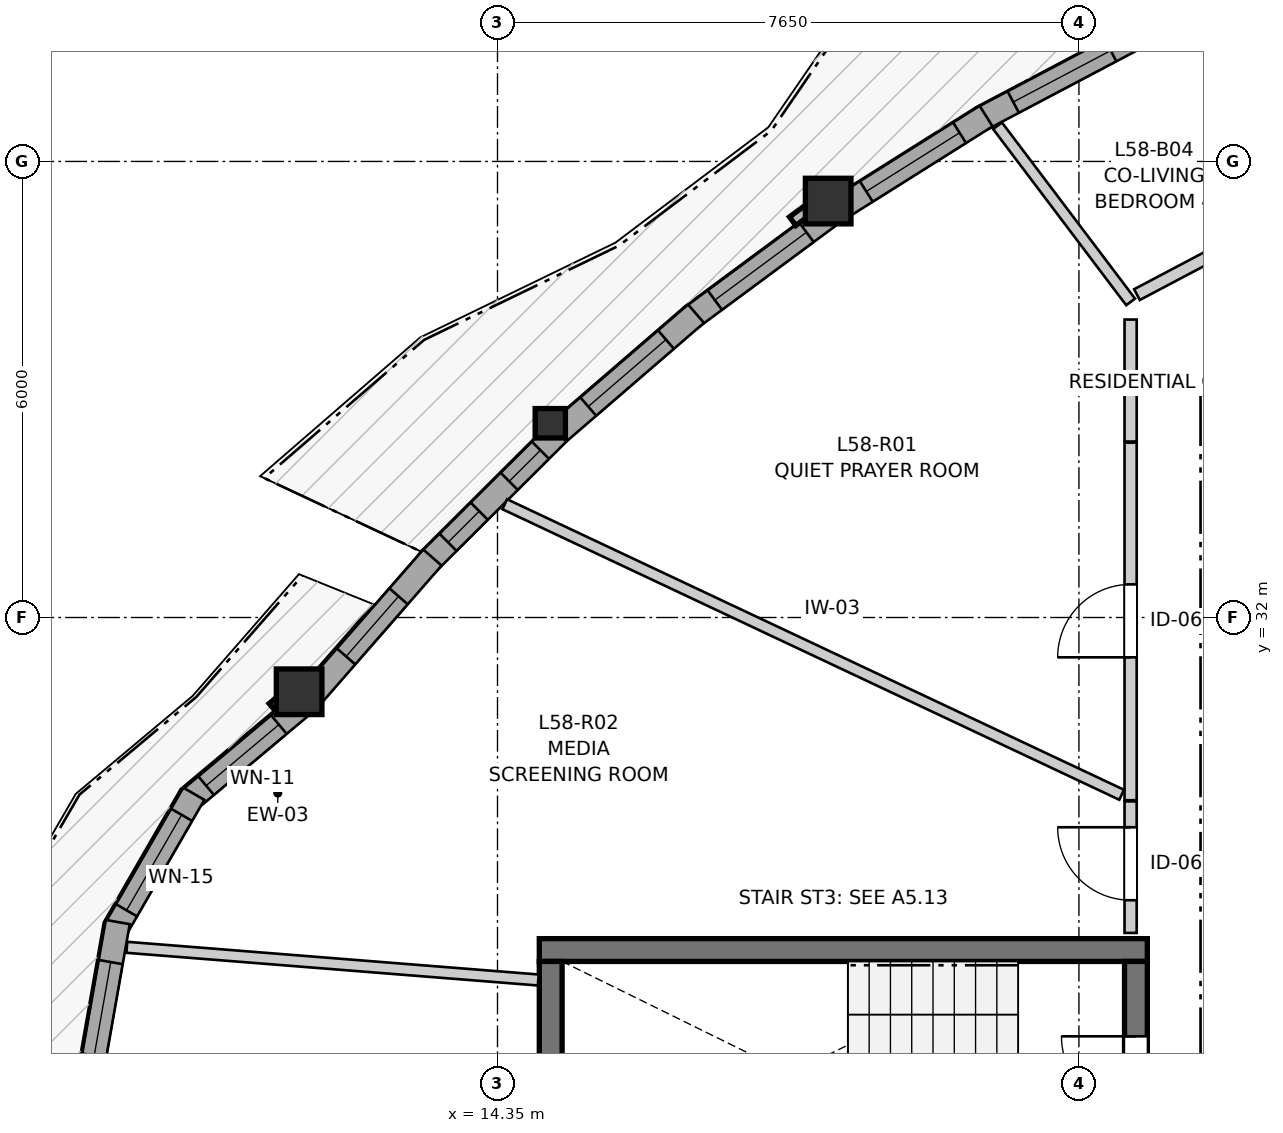
"""IFC4 building model, lengths in metres.
Left out: names, types, materials, properties, quantities, classifications, styles, units other than length and angle.
Written with IfcOpenShell. Run it as: python <this file> out.ifc"""

import sys

from ifc_helpers import new_model, si_unit, direction, frame, frame_2d, origin, origin_2d, place, context, subcontext, project, spatial, rectangle, i_section, extrude, source, transform, mapped, element, fill, save


model = new_model("IFC4")
c1 = context("Model", 3, precision=1e-05, world=origin(), true_north=direction((0.0, 1.0)))
c2 = subcontext(c1, "Body", "Model", "MODEL_VIEW")
j1 = project(units=[si_unit("LENGTHUNIT", "METRE"), si_unit("PLANEANGLEUNIT", "RADIAN")], contexts=[c1])
p1 = place(None, origin())
s1 = spatial("IfcSite", under=j1, at=p1, CompositionType="ELEMENT")
p2 = place(p1, origin())
s2 = spatial("IfcBuilding", under=s1, at=p2, CompositionType="ELEMENT")
p3 = place(p2, frame((0.0, 0.0, 195.6)))
s3 = spatial("IfcBuildingStorey", under=s2, at=p3, CompositionType="ELEMENT", Elevation=195.6)
p4 = place(p3, frame((22.9, 27.625, 0.0), z_axis=(0.0, 0.0, 1.0), x_axis=(-1.0, 0.0, 0.0)))
e1 = element("IfcWall", 1, at=p4, inside=s3, PredefinedType="SHEAR", context=c2, shape_type="SweptSolid", body=[
    extrude(rectangle(XDim=8.0, YDim=0.3, at=frame_2d((4.0, 0.0))), origin(), (0.0, 0.0, 1.0), 2.96),
])
p5 = place(p3, frame((15.05, 27.475, 0.0), z_axis=(0.0, 0.0, 1.0), x_axis=(0.0, -1.0, 0.0)))
e2 = element("IfcWall", 2, at=p5, inside=s3, PredefinedType="SHEAR", context=c2, shape_type="SweptSolid", body=[
    extrude(rectangle(XDim=2.95, YDim=0.3, at=frame_2d((1.475, 0.0))), origin(), (0.0, 0.0, 1.0), 2.96),
])
p6 = place(p3, frame((22.75, 24.525, 0.0), z_axis=(0.0, 0.0, 1.0), x_axis=(0.0, 1.0, 0.0)))
e3 = element("IfcWall", 3, at=p6, inside=s3, PredefinedType="SHEAR", context=c2, shape_type="SweptSolid", body=[
    extrude(rectangle(XDim=2.95, YDim=0.3, at=frame_2d((1.475, 0.0))), origin(), (0.0, 0.0, 1.0), 2.96),
])
p7 = place(p6, frame((0.985, 0.0, 0.0)))
e4 = element("IfcOpeningElement", 4, at=p7, cuts=e3, PredefinedType="OPENING", context=c2, shape_type="SweptSolid", body=[
    extrude(rectangle(XDim=0.98, YDim=2.15, at=frame_2d((0.49, 1.075))), frame((0.0, 0.16, 0.0), z_axis=(0.0, -1.0, 0.0), x_axis=(1.0, 0.0, 0.0)), (0.0, 0.0, 1.0), 0.32),
])
m1 = source(origin(), c2, "Body", "SweptSolid", [
    extrude(rectangle(XDim=0.6, YDim=0.6, at=origin_2d()), origin(), (0.0, 0.0, 1.0), 2.96),
])
for number, where, z_axis, x_axis in (
    (5, (11.74, 31.023, 0.0), (0.0, 0.0, 1.0), (1.0, 0.0, 0.0)),
    (6, (18.701, 37.479, 0.0), (0.0, 0.0, 1.0), (1.0, 0.0, 0.0)),
):
    element("IfcColumn", number, at=place(p3, frame(where, z_axis=z_axis, x_axis=x_axis)), inside=s3, PredefinedType="COLUMN", context=c2, shape_type="MappedRepresentation", body=[
        mapped(m1, transform((0.0, 0.0, 0.0), x_axis=(1.0, 0.0, 0.0), y_axis=(0.0, 1.0, 0.0), z_axis=(0.0, 0.0, 1.0), scale=1.0)),
    ])
m2 = source(origin(), c2, "Body", "SweptSolid", [
    extrude(i_section(OverallWidth=0.398, OverallDepth=0.387, WebThickness=0.019, FlangeThickness=0.03, FilletRadius=0.015, at=origin_2d()), origin(), (0.0, 0.0, 1.0), 2.96),
])
p8 = place(p3, frame((15.044, 34.555, 0.0), z_axis=(0.0, 0.0, 1.0), x_axis=(1.0, 0.0, 0.0)))
e7 = element("IfcColumn", 7, at=p8, inside=s3, PredefinedType="PILASTER", context=c2, shape_type="MappedRepresentation", body=[
    mapped(m2, transform((0.0, 0.0, 0.0), x_axis=(1.0, 0.0, 0.0), y_axis=(0.0, 1.0, 0.0), z_axis=(0.0, 0.0, 1.0), scale=1.0)),
])
p9 = place(p3, frame((11.774, 30.843, 0.0), z_axis=(0.0, 0.0, 1.0), x_axis=(-0.766116451135, -0.642701784112, 0.0)))
e8 = element("IfcWall", 8, at=p9, inside=s3, PredefinedType="SOLIDWALL", context=c2, shape_type="SweptSolid", body=[
    extrude(rectangle(XDim=1.962, YDim=0.32, at=frame_2d((0.981, 0.0))), origin(), (0.0, 0.0, 1.0), 2.58),
])
p10 = place(p9, frame((0.391, 0.0, 0.82)))
e9 = element("IfcOpeningElement", 9, at=p10, cuts=e8, PredefinedType="OPENING", context=c2, shape_type="SweptSolid", body=[
    extrude(rectangle(XDim=1.25, YDim=1.35, at=frame_2d((0.625, 0.675))), frame((0.0, 0.17, 0.0), z_axis=(0.0, -1.0, 0.0), x_axis=(1.0, 0.0, 0.0)), (0.0, 0.0, 1.0), 0.34),
])
p11 = place(p3, frame((10.354, 29.681, 0.0), z_axis=(0.0, 0.0, 1.0), x_axis=(-0.499995423472, -0.866028046028, 0.0)))
e10 = element("IfcWall", 10, at=p11, inside=s3, PredefinedType="SOLIDWALL", context=c2, shape_type="SweptSolid", body=[
    extrude(rectangle(XDim=2.09, YDim=0.32, at=frame_2d((1.045, 0.0))), origin(), (0.0, 0.0, 1.0), 2.58),
])
p12 = place(p11, frame((0.32, 0.0, 0.82)))
e11 = element("IfcOpeningElement", 11, at=p12, cuts=e10, PredefinedType="OPENING", context=c2, shape_type="SweptSolid", body=[
    extrude(rectangle(XDim=1.45, YDim=1.25, at=frame_2d((0.725, 0.625))), frame((0.0, 0.17, 0.0), z_axis=(0.0, -1.0, 0.0), x_axis=(1.0, 0.0, 0.0)), (0.0, 0.0, 1.0), 0.34),
])
p13 = place(p3, frame((9.354, 27.993, 0.0), z_axis=(0.0, 0.0, 1.0), x_axis=(-0.173672066494, -0.984803540469, 0.0)))
e12 = element("IfcWall", 12, at=p13, inside=s3, PredefinedType="SOLIDWALL", context=c2, shape_type="SweptSolid", body=[
    extrude(rectangle(XDim=2.09, YDim=0.32, at=frame_2d((1.045, 0.0))), origin(), (0.0, 0.0, 1.0), 2.58),
])
p14 = place(p13, frame((0.535, 0.0, 0.82)))
e13 = element("IfcOpeningElement", 13, at=p14, cuts=e12, PredefinedType="OPENING", context=c2, shape_type="SweptSolid", body=[
    extrude(rectangle(XDim=1.25, YDim=1.35, at=frame_2d((0.625, 0.675))), frame((0.0, 0.17, 0.0), z_axis=(0.0, -1.0, 0.0), x_axis=(1.0, 0.0, 0.0)), (0.0, 0.0, 1.0), 0.34),
])
p15 = place(p3, frame((22.766, 39.642, 0.0), z_axis=(0.0, 0.0, 1.0), x_axis=(-0.884377555637, -0.466772256122, 0.0)))
e14 = element("IfcWall", 14, at=p15, inside=s3, PredefinedType="SOLIDWALL", context=c2, shape_type="SweptSolid", body=[
    extrude(rectangle(XDim=2.334, YDim=0.32, at=frame_2d((1.167, 0.0))), origin(), (0.0, 0.0, 1.0), 2.58),
])
p16 = place(p15, frame((0.393, 0.0, 0.82)))
e15 = element("IfcOpeningElement", 15, at=p16, cuts=e14, PredefinedType="OPENING", context=c2, shape_type="SweptSolid", body=[
    extrude(rectangle(XDim=1.45, YDim=1.25, at=frame_2d((0.725, 0.625))), frame((0.0, 0.17, 0.0), z_axis=(0.0, -1.0, 0.0), x_axis=(1.0, 0.0, 0.0)), (0.0, 0.0, 1.0), 0.34),
])
p17 = place(p3, frame((20.778, 38.597, 0.0), z_axis=(0.0, 0.0, 1.0), x_axis=(-0.84639489148, -0.532555807101, 0.0)))
e16 = element("IfcWall", 16, at=p17, inside=s3, PredefinedType="SOLIDWALL", context=c2, shape_type="SweptSolid", body=[
    extrude(rectangle(XDim=2.264, YDim=0.32, at=frame_2d((1.132, 0.0))), origin(), (0.0, 0.0, 1.0), 2.58),
])
p18 = place(p17, frame((0.412, 0.0, 0.82)))
e17 = element("IfcOpeningElement", 17, at=p18, cuts=e16, PredefinedType="OPENING", context=c2, shape_type="SweptSolid", body=[
    extrude(rectangle(XDim=1.45, YDim=1.25, at=frame_2d((0.725, 0.625))), frame((0.0, 0.17, 0.0), z_axis=(0.0, -1.0, 0.0), x_axis=(1.0, 0.0, 0.0)), (0.0, 0.0, 1.0), 0.34),
])
p19 = place(p3, frame((18.724, 37.296, 0.0), z_axis=(0.0, 0.0, 1.0), x_axis=(-0.803830620004, -0.59485824727, 0.0)))
e18 = element("IfcWall", 18, at=p19, inside=s3, PredefinedType="SOLIDWALL", context=c2, shape_type="SweptSolid", body=[
    extrude(rectangle(XDim=2.277, YDim=0.32, at=frame_2d((1.139, 0.0))), origin(), (0.0, 0.0, 1.0), 2.58),
])
p20 = place(p19, frame((0.384, 0.0, 0.82)))
e19 = element("IfcOpeningElement", 19, at=p20, cuts=e18, PredefinedType="OPENING", context=c2, shape_type="SweptSolid", body=[
    extrude(rectangle(XDim=1.5, YDim=1.45, at=frame_2d((0.75, 0.725))), frame((0.0, 0.17, 0.0), z_axis=(0.0, -1.0, 0.0), x_axis=(1.0, 0.0, 0.0)), (0.0, 0.0, 1.0), 0.34),
])
p21 = place(p3, frame((16.962, 35.997, 0.0), z_axis=(0.0, 0.0, 1.0), x_axis=(-0.757474860475, -0.652864331808, 0.0)))
e20 = element("IfcWall", 20, at=p21, inside=s3, PredefinedType="SOLIDWALL", context=c2, shape_type="SweptSolid", body=[
    extrude(rectangle(XDim=2.374, YDim=0.32, at=frame_2d((1.187, 0.0))), origin(), (0.0, 0.0, 1.0), 2.58),
])
p22 = place(p21, frame((0.522, 0.0, 0.82)))
e21 = element("IfcOpeningElement", 21, at=p22, cuts=e20, PredefinedType="OPENING", context=c2, shape_type="SweptSolid", body=[
    extrude(rectangle(XDim=1.35, YDim=1.45, at=frame_2d((0.675, 0.725))), frame((0.0, 0.17, 0.0), z_axis=(0.0, -1.0, 0.0), x_axis=(1.0, 0.0, 0.0)), (0.0, 0.0, 1.0), 0.34),
])
p23 = place(p3, frame((15.143, 34.428, 0.0), z_axis=(0.0, 0.0, 1.0), x_axis=(-0.708370597245, -0.705840702255, 0.0)))
e22 = element("IfcWall", 22, at=p23, inside=s3, PredefinedType="SOLIDWALL", context=c2, shape_type="SweptSolid", body=[
    extrude(rectangle(XDim=2.413, YDim=0.32, at=frame_2d((1.206, 0.0))), origin(), (0.0, 0.0, 1.0), 2.58),
])
p24 = place(p23, frame((0.322, 0.0, 0.82)))
e23 = element("IfcOpeningElement", 23, at=p24, cuts=e22, PredefinedType="OPENING", context=c2, shape_type="SweptSolid", body=[
    extrude(rectangle(XDim=0.58, YDim=1.35, at=frame_2d((0.29, 0.675))), frame((0.0, 0.17, 0.0), z_axis=(0.0, -1.0, 0.0), x_axis=(1.0, 0.0, 0.0)), (0.0, 0.0, 1.0), 0.34),
])
p25 = place(p23, frame((1.458, 0.0, 0.82)))
e24 = element("IfcOpeningElement", 24, at=p25, cuts=e22, PredefinedType="OPENING", context=c2, shape_type="SweptSolid", body=[
    extrude(rectangle(XDim=0.58, YDim=1.35, at=frame_2d((0.29, 0.675))), frame((0.0, 0.17, 0.0), z_axis=(0.0, -1.0, 0.0), x_axis=(1.0, 0.0, 0.0)), (0.0, 0.0, 1.0), 0.34),
])
p26 = place(p3, frame((13.494, 32.789, 0.0), z_axis=(0.0, 0.0, 1.0), x_axis=(-0.65765213646, -0.753321755566, 0.0)))
e25 = element("IfcWall", 25, at=p26, inside=s3, PredefinedType="SOLIDWALL", context=c2, shape_type="SweptSolid", body=[
    extrude(rectangle(XDim=2.394, YDim=0.32, at=frame_2d((1.197, 0.0))), origin(), (0.0, 0.0, 1.0), 2.58),
])
p27 = place(p26, frame((0.677, 0.0, 0.82)))
e26 = element("IfcOpeningElement", 26, at=p27, cuts=e25, PredefinedType="OPENING", context=c2, shape_type="SweptSolid", body=[
    extrude(rectangle(XDim=1.05, YDim=1.45, at=frame_2d((0.525, 0.725))), frame((0.0, 0.17, 0.0), z_axis=(0.0, -1.0, 0.0), x_axis=(1.0, 0.0, 0.0)), (0.0, 0.0, 1.0), 0.34),
])
p28 = place(p3, frame((22.68, 29.596, 0.0), z_axis=(0.0, 0.0, 1.0), x_axis=(0.0, 1.0, 0.0)))
e27 = element("IfcWall", 27, at=p28, inside=s3, PredefinedType="PARTITIONING", context=c2, shape_type="SweptSolid", body=[
    extrude(rectangle(XDim=4.704, YDim=0.16, at=frame_2d((2.352, 0.0))), origin(), (0.0, 0.0, 1.0), 2.96),
])
p29 = place(p28, frame((1.88, 0.0, 0.0)))
e28 = element("IfcOpeningElement", 28, at=p29, cuts=e27, PredefinedType="OPENING", context=c2, shape_type="SweptSolid", body=[
    extrude(rectangle(XDim=0.96, YDim=2.1, at=frame_2d((0.48, 1.05))), frame((0.0, 0.09, 0.0), z_axis=(0.0, -1.0, 0.0), x_axis=(1.0, 0.0, 0.0)), (0.0, 0.0, 1.0), 0.18),
])
p30 = place(p3, frame((22.68, 27.85, 0.0), z_axis=(0.0, 0.0, 1.0), x_axis=(0.0, 1.0, 0.0)))
e29 = element("IfcWall", 29, at=p30, inside=s3, PredefinedType="PARTITIONING", context=c2, shape_type="SweptSolid", body=[
    extrude(rectangle(XDim=1.731, YDim=0.16, at=frame_2d((0.865, 0.0))), origin(), (0.0, 0.0, 1.0), 2.96),
])
p31 = place(p30, frame((0.43, 0.0, 0.0)))
e30 = element("IfcOpeningElement", 30, at=p31, cuts=e29, PredefinedType="OPENING", context=c2, shape_type="SweptSolid", body=[
    extrude(rectangle(XDim=0.96, YDim=2.1, at=frame_2d((0.48, 1.05))), frame((0.0, 0.09, 0.0), z_axis=(0.0, -1.0, 0.0), x_axis=(1.0, 0.0, 0.0)), (0.0, 0.0, 1.0), 0.18),
])
p32 = place(p3, frame((14.445, 33.49, 0.0), z_axis=(0.0, 0.0, 1.0), x_axis=(0.904673727325, -0.426104971912, 0.0)))
e31 = element("IfcWall", 31, at=p32, inside=s3, PredefinedType="PARTITIONING", context=c2, shape_type="SweptSolid", body=[
    extrude(rectangle(XDim=8.972, YDim=0.145, at=frame_2d((4.486, 0.0))), origin(), (0.0, 0.0, 1.0), 2.96),
])
p33 = place(p3, frame((9.473, 27.661, 0.0), z_axis=(0.0, 0.0, 1.0), x_axis=(0.996864548282, -0.079126938392, 0.0)))
e32 = element("IfcWall", 32, at=p33, inside=s3, PredefinedType="PARTITIONING", context=c2, shape_type="SweptSolid", body=[
    extrude(rectangle(XDim=5.43, YDim=0.145, at=frame_2d((2.715, 0.0))), origin(), (0.0, 0.0, 1.0), 2.96),
])
p34 = place(p3, frame((20.929, 38.469, 0.0), z_axis=(0.0, 0.0, 1.0), x_axis=(0.602847358209, -0.797856542682, 0.0)))
e33 = element("IfcWall", 33, at=p34, inside=s3, PredefinedType="PARTITIONING", context=c2, shape_type="SweptSolid", body=[
    extrude(rectangle(XDim=2.905, YDim=0.145, at=frame_2d((1.452, 0.0))), origin(), (0.0, 0.0, 1.0), 2.96),
])
p35 = place(p3, frame((22.68, 34.315, 0.0), z_axis=(0.0, 0.0, 1.0), x_axis=(0.0, 1.0, 0.0)))
e34 = element("IfcWall", 34, at=p35, inside=s3, PredefinedType="PARTITIONING", context=c2, shape_type="SweptSolid", body=[
    extrude(rectangle(XDim=1.605, YDim=0.16, at=frame_2d((0.802, 0.0))), origin(), (0.0, 0.0, 1.0), 2.96),
])
p36 = place(p3, frame((22.764, 36.248, 0.0), z_axis=(0.0, 0.0, 1.0), x_axis=(0.884318813942, 0.466883535059, 0.0)))
e35 = element("IfcWall", 35, at=p36, inside=s3, PredefinedType="PARTITIONING", context=c2, shape_type="SweptSolid", body=[
    extrude(rectangle(XDim=1.486, YDim=0.16, at=frame_2d((0.743, 0.0))), origin(), (0.0, 0.0, 1.0), 2.96),
])
m3 = source(origin(), c2, "Body", "SweptSolid", [
    extrude(rectangle(XDim=1.25, YDim=1.35, at=frame_2d((0.625, 0.675))), frame((0.0, 0.03, 0.0), z_axis=(0.0, -1.0, 0.0), x_axis=(1.0, 0.0, 0.0)), (0.0, 0.0, 1.0), 0.06),
])
p37 = place(p10, origin())
e36 = element("IfcWindow", 36, at=p37, inside=s3, PartitioningType="SINGLE_PANEL", PredefinedType="WINDOW", context=c2, shape_type="MappedRepresentation", body=[
    mapped(m3, transform((0.0, 0.0, 0.0), x_axis=(1.0, 0.0, 0.0), y_axis=(0.0, 1.0, 0.0), z_axis=(0.0, 0.0, 1.0), scale=1.0)),
])
fill(e9, e36)
m4 = source(origin(), c2, "Body", "SweptSolid", [
    extrude(rectangle(XDim=1.45, YDim=1.25, at=frame_2d((0.725, 0.625))), frame((0.0, 0.03, 0.0), z_axis=(0.0, -1.0, 0.0), x_axis=(1.0, 0.0, 0.0)), (0.0, 0.0, 1.0), 0.06),
])
p38 = place(p12, origin())
e37 = element("IfcWindow", 37, at=p38, inside=s3, PartitioningType="SINGLE_PANEL", PredefinedType="WINDOW", context=c2, shape_type="MappedRepresentation", body=[
    mapped(m4, transform((0.0, 0.0, 0.0), x_axis=(1.0, 0.0, 0.0), y_axis=(0.0, 1.0, 0.0), z_axis=(0.0, 0.0, 1.0), scale=1.0)),
])
fill(e11, e37)
p39 = place(p14, origin())
e38 = element("IfcWindow", 38, at=p39, inside=s3, PartitioningType="SINGLE_PANEL", PredefinedType="WINDOW", context=c2, shape_type="MappedRepresentation", body=[
    mapped(m3, transform((0.0, 0.0, 0.0), x_axis=(1.0, 0.0, 0.0), y_axis=(0.0, 1.0, 0.0), z_axis=(0.0, 0.0, 1.0), scale=1.0)),
])
fill(e13, e38)
p40 = place(p16, origin())
e39 = element("IfcWindow", 39, at=p40, inside=s3, PartitioningType="SINGLE_PANEL", PredefinedType="WINDOW", context=c2, shape_type="MappedRepresentation", body=[
    mapped(m4, transform((0.0, 0.0, 0.0), x_axis=(1.0, 0.0, 0.0), y_axis=(0.0, 1.0, 0.0), z_axis=(0.0, 0.0, 1.0), scale=1.0)),
])
fill(e15, e39)
p41 = place(p18, origin())
e40 = element("IfcWindow", 40, at=p41, inside=s3, PartitioningType="SINGLE_PANEL", PredefinedType="WINDOW", context=c2, shape_type="MappedRepresentation", body=[
    mapped(m4, transform((0.0, 0.0, 0.0), x_axis=(1.0, 0.0, 0.0), y_axis=(0.0, 1.0, 0.0), z_axis=(0.0, 0.0, 1.0), scale=1.0)),
])
fill(e17, e40)
m5 = source(origin(), c2, "Body", "SweptSolid", [
    extrude(rectangle(XDim=1.5, YDim=1.45, at=frame_2d((0.75, 0.725))), frame((0.0, 0.03, 0.0), z_axis=(0.0, -1.0, 0.0), x_axis=(1.0, 0.0, 0.0)), (0.0, 0.0, 1.0), 0.06),
])
p42 = place(p20, origin())
e41 = element("IfcWindow", 41, at=p42, inside=s3, PartitioningType="SINGLE_PANEL", PredefinedType="WINDOW", context=c2, shape_type="MappedRepresentation", body=[
    mapped(m5, transform((0.0, 0.0, 0.0), x_axis=(1.0, 0.0, 0.0), y_axis=(0.0, 1.0, 0.0), z_axis=(0.0, 0.0, 1.0), scale=1.0)),
])
fill(e19, e41)
m6 = source(origin(), c2, "Body", "SweptSolid", [
    extrude(rectangle(XDim=1.35, YDim=1.45, at=frame_2d((0.675, 0.725))), frame((0.0, 0.03, 0.0), z_axis=(0.0, -1.0, 0.0), x_axis=(1.0, 0.0, 0.0)), (0.0, 0.0, 1.0), 0.06),
])
p43 = place(p22, origin())
e42 = element("IfcWindow", 42, at=p43, inside=s3, PartitioningType="SINGLE_PANEL", PredefinedType="WINDOW", context=c2, shape_type="MappedRepresentation", body=[
    mapped(m6, transform((0.0, 0.0, 0.0), x_axis=(1.0, 0.0, 0.0), y_axis=(0.0, 1.0, 0.0), z_axis=(0.0, 0.0, 1.0), scale=1.0)),
])
fill(e21, e42)
m7 = source(origin(), c2, "Body", "SweptSolid", [
    extrude(rectangle(XDim=0.58, YDim=1.35, at=frame_2d((0.29, 0.675))), frame((0.0, 0.03, 0.0), z_axis=(0.0, -1.0, 0.0), x_axis=(1.0, 0.0, 0.0)), (0.0, 0.0, 1.0), 0.06),
])
p44 = place(p24, origin())
e43 = element("IfcWindow", 43, at=p44, inside=s3, PartitioningType="SINGLE_PANEL", PredefinedType="WINDOW", context=c2, shape_type="MappedRepresentation", body=[
    mapped(m7, transform((0.0, 0.0, 0.0), x_axis=(1.0, 0.0, 0.0), y_axis=(0.0, 1.0, 0.0), z_axis=(0.0, 0.0, 1.0), scale=1.0)),
])
fill(e23, e43)
p45 = place(p25, origin())
e44 = element("IfcWindow", 44, at=p45, inside=s3, PartitioningType="SINGLE_PANEL", PredefinedType="WINDOW", context=c2, shape_type="MappedRepresentation", body=[
    mapped(m7, transform((0.0, 0.0, 0.0), x_axis=(1.0, 0.0, 0.0), y_axis=(0.0, 1.0, 0.0), z_axis=(0.0, 0.0, 1.0), scale=1.0)),
])
fill(e24, e44)
m8 = source(origin(), c2, "Body", "SweptSolid", [
    extrude(rectangle(XDim=1.05, YDim=1.45, at=frame_2d((0.525, 0.725))), frame((0.0, 0.03, 0.0), z_axis=(0.0, -1.0, 0.0), x_axis=(1.0, 0.0, 0.0)), (0.0, 0.0, 1.0), 0.06),
])
p46 = place(p27, origin())
e45 = element("IfcWindow", 45, at=p46, inside=s3, PartitioningType="SINGLE_PANEL", PredefinedType="WINDOW", context=c2, shape_type="MappedRepresentation", body=[
    mapped(m8, transform((0.0, 0.0, 0.0), x_axis=(1.0, 0.0, 0.0), y_axis=(0.0, 1.0, 0.0), z_axis=(0.0, 0.0, 1.0), scale=1.0)),
])
fill(e26, e45)
m9 = source(origin(), c2, "Body", "SweptSolid", [
    extrude(rectangle(XDim=0.98, YDim=2.15, at=frame_2d((0.49, 1.075))), frame((0.0, 0.025, 0.0), z_axis=(0.0, -1.0, 0.0), x_axis=(1.0, 0.0, 0.0)), (0.0, 0.0, 1.0), 0.05),
])
p47 = place(p7, origin())
e46 = element("IfcDoor", 46, at=p47, inside=s3, OperationType="SINGLE_SWING_RIGHT", PredefinedType="DOOR", context=c2, shape_type="MappedRepresentation", body=[
    mapped(m9, transform((0.0, 0.0, 0.0), x_axis=(1.0, 0.0, 0.0), y_axis=(0.0, 1.0, 0.0), z_axis=(0.0, 0.0, 1.0), scale=1.0)),
])
fill(e4, e46)
m10 = source(origin(), c2, "Body", "SweptSolid", [
    extrude(rectangle(XDim=0.96, YDim=2.1, at=frame_2d((0.48, 1.05))), frame((0.0, 0.025, 0.0), z_axis=(0.0, -1.0, 0.0), x_axis=(1.0, 0.0, 0.0)), (0.0, 0.0, 1.0), 0.05),
])
p48 = place(p29, origin())
e47 = element("IfcDoor", 47, at=p48, inside=s3, OperationType="SINGLE_SWING_LEFT", PredefinedType="DOOR", context=c2, shape_type="MappedRepresentation", body=[
    mapped(m10, transform((0.0, 0.0, 0.0), x_axis=(1.0, 0.0, 0.0), y_axis=(0.0, 1.0, 0.0), z_axis=(0.0, 0.0, 1.0), scale=1.0)),
])
fill(e28, e47)
p49 = place(p31, origin())
e48 = element("IfcDoor", 48, at=p49, inside=s3, OperationType="SINGLE_SWING_RIGHT", PredefinedType="DOOR", context=c2, shape_type="MappedRepresentation", body=[
    mapped(m10, transform((0.0, 0.0, 0.0), x_axis=(1.0, 0.0, 0.0), y_axis=(0.0, 1.0, 0.0), z_axis=(0.0, 0.0, 1.0), scale=1.0)),
])
fill(e30, e48)
save(model, sys.argv[1])
